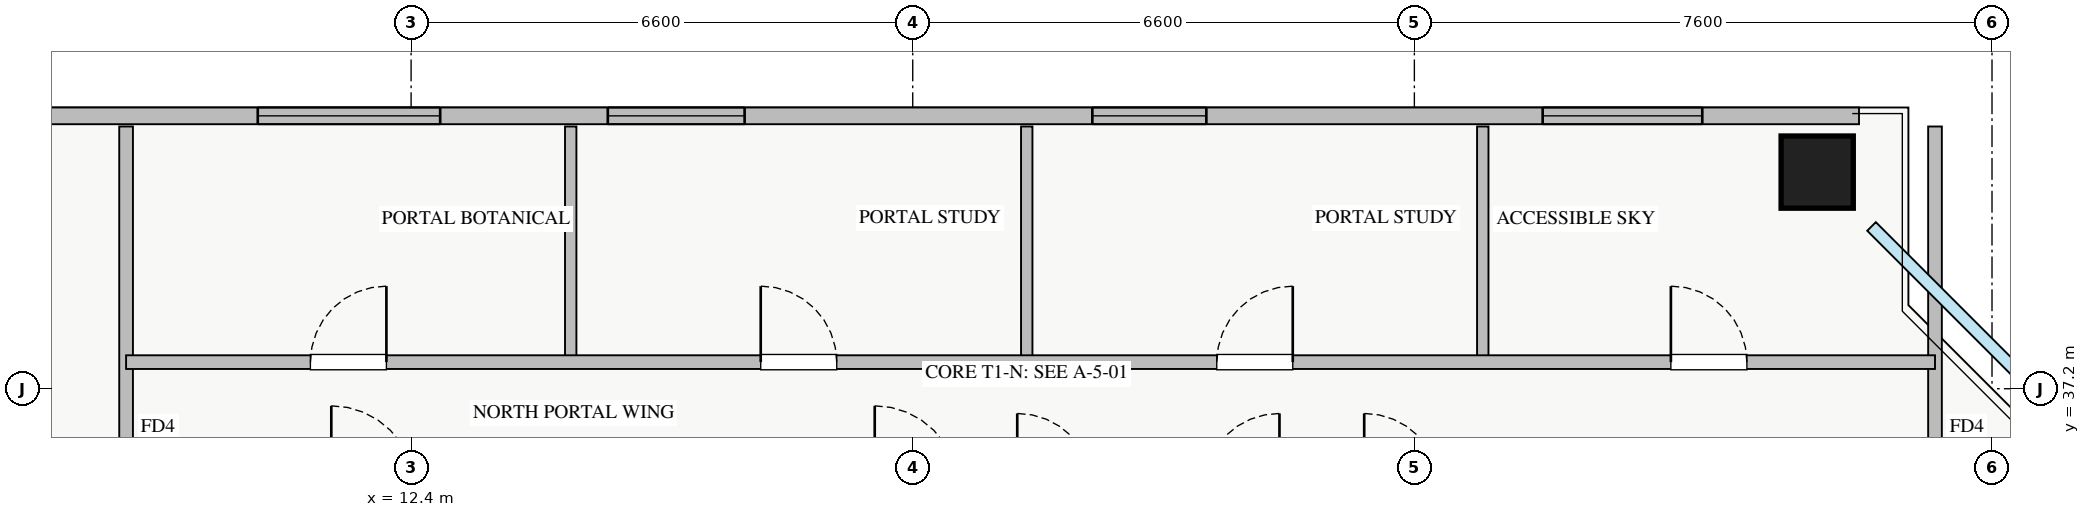
"""IFC4 building model, lengths in metres.
Left out: names, types, materials, properties, quantities, classifications, styles, units other than length and angle.
Written with IfcOpenShell. Run it as: python <this file> out.ifc"""

import sys

from ifc_helpers import new_model, si_unit, direction, frame, frame_2d, origin, origin_2d, place, context, subcontext, project, spatial, rectangle, extrude, source, transform, mapped, element, fill, save


model = new_model("IFC4")
c1 = context("Model", 3, precision=1e-05, world=origin(), true_north=direction((0.0, 1.0)))
c2 = subcontext(c1, "Body", "Model", "MODEL_VIEW")
j1 = project(units=[si_unit("LENGTHUNIT", "METRE"), si_unit("PLANEANGLEUNIT", "RADIAN")], contexts=[c1])
p1 = place(None, origin())
s1 = spatial("IfcSite", under=j1, at=p1, CompositionType="ELEMENT")
p2 = place(p1, origin())
s2 = spatial("IfcBuilding", under=s1, at=p2, CompositionType="ELEMENT")
p3 = place(p2, frame((0.0, 0.0, 166.5)))
s3 = spatial("IfcBuildingStorey", under=s2, at=p3, CompositionType="ELEMENT", Elevation=166.5)
m1 = source(origin(), c2, "Body", "SweptSolid", [
    extrude(rectangle(XDim=0.95, YDim=0.95, at=origin_2d()), origin(), (0.0, 0.0, 1.0), 3.25),
])
p4 = place(p3, frame((30.9, 40.05, 0.0), z_axis=(0.0, 0.0, 1.0), x_axis=(1.0, 0.0, 0.0)))
e1 = element("IfcColumn", 1, at=p4, inside=s3, PredefinedType="COLUMN", context=c2, shape_type="MappedRepresentation", body=[
    mapped(m1, transform((0.0, 0.0, 0.0), x_axis=(1.0, 0.0, 0.0), y_axis=(0.0, 1.0, 0.0), z_axis=(0.0, 0.0, 1.0), scale=1.0)),
])
p5 = place(p3, frame((6.55, 40.79, 0.0), z_axis=(0.0, 0.0, 1.0), x_axis=(1.0, 0.0, 0.0)))
e2 = element("IfcWall", 2, at=p5, inside=s3, PredefinedType="STANDARD", context=c2, shape_type="SweptSolid", body=[
    extrude(rectangle(XDim=24.9, YDim=0.22, at=frame_2d((12.45, 0.0))), origin(), (0.0, 0.0, 1.0), 2.61),
])
p6 = place(p5, frame((3.833, 0.0, 0.9)))
e3 = element("IfcOpeningElement", 3, at=p6, cuts=e2, PredefinedType="OPENING", context=c2, shape_type="SweptSolid", body=[
    extrude(rectangle(XDim=2.4, YDim=1.5, at=frame_2d((1.2, 0.75))), frame((0.0, 0.12, 0.0), z_axis=(0.0, -1.0, 0.0), x_axis=(1.0, 0.0, 0.0)), (0.0, 0.0, 1.0), 0.24),
])
p7 = place(p5, frame((8.438, 0.0, 0.9)))
e4 = element("IfcOpeningElement", 4, at=p7, cuts=e2, PredefinedType="OPENING", context=c2, shape_type="SweptSolid", body=[
    extrude(rectangle(XDim=1.8, YDim=1.45, at=frame_2d((0.9, 0.725))), frame((0.0, 0.12, 0.0), z_axis=(0.0, -1.0, 0.0), x_axis=(1.0, 0.0, 0.0)), (0.0, 0.0, 1.0), 0.24),
])
p8 = place(p5, frame((14.813, 0.0, 0.9)))
e5 = element("IfcOpeningElement", 5, at=p8, cuts=e2, PredefinedType="OPENING", context=c2, shape_type="SweptSolid", body=[
    extrude(rectangle(XDim=1.5, YDim=1.45, at=frame_2d((0.75, 0.725))), frame((0.0, 0.12, 0.0), z_axis=(0.0, -1.0, 0.0), x_axis=(1.0, 0.0, 0.0)), (0.0, 0.0, 1.0), 0.24),
])
p9 = place(p5, frame((20.738, 0.0, 0.9)))
e6 = element("IfcOpeningElement", 6, at=p9, cuts=e2, PredefinedType="OPENING", context=c2, shape_type="SweptSolid", body=[
    extrude(rectangle(XDim=2.1, YDim=1.48, at=frame_2d((1.05, 0.74))), frame((0.0, 0.12, 0.0), z_axis=(0.0, -1.0, 0.0), x_axis=(1.0, 0.0, 0.0)), (0.0, 0.0, 1.0), 0.24),
])
p10 = place(p3, frame((8.65, 29.3, 0.0), z_axis=(0.0, 0.0, 1.0), x_axis=(0.0, 1.0, 0.0)))
e7 = element("IfcWall", 7, at=p10, inside=s3, PredefinedType="PARTITIONING", context=c2, shape_type="SweptSolid", body=[
    extrude(rectangle(XDim=11.35, YDim=0.18, at=frame_2d((5.675, 0.0))), origin(), (0.0, 0.0, 1.0), 3.07),
])
p11 = place(p10, frame((1.9, 0.0, 0.0)))
e8 = element("IfcOpeningElement", 8, at=p11, cuts=e7, PredefinedType="OPENING", context=c2, shape_type="SweptSolid", body=[
    extrude(rectangle(XDim=1.0, YDim=2.05, at=frame_2d((0.5, 1.025))), frame((0.0, 0.1, 0.0), z_axis=(0.0, -1.0, 0.0), x_axis=(1.0, 0.0, 0.0)), (0.0, 0.0, 1.0), 0.2),
])
p12 = place(p10, frame((5.95, 0.0, 0.0)))
e9 = element("IfcOpeningElement", 9, at=p12, cuts=e7, PredefinedType="OPENING", context=c2, shape_type="SweptSolid", body=[
    extrude(rectangle(XDim=1.0, YDim=2.05, at=frame_2d((0.5, 1.025))), frame((0.0, 0.1, 0.0), z_axis=(0.0, -1.0, 0.0), x_axis=(1.0, 0.0, 0.0)), (0.0, 0.0, 1.0), 0.2),
])
p13 = place(p3, frame((32.45, 29.3, 0.0), z_axis=(0.0, 0.0, 1.0), x_axis=(0.0, 1.0, 0.0)))
e10 = element("IfcWall", 10, at=p13, inside=s3, PredefinedType="PARTITIONING", context=c2, shape_type="SweptSolid", body=[
    extrude(rectangle(XDim=11.35, YDim=0.18, at=frame_2d((5.675, 0.0))), origin(), (0.0, 0.0, 1.0), 3.07),
])
p14 = place(p13, frame((1.9, 0.0, 0.0)))
e11 = element("IfcOpeningElement", 11, at=p14, cuts=e10, PredefinedType="OPENING", context=c2, shape_type="SweptSolid", body=[
    extrude(rectangle(XDim=1.0, YDim=2.05, at=frame_2d((0.5, 1.025))), frame((0.0, 0.1, 0.0), z_axis=(0.0, -1.0, 0.0), x_axis=(1.0, 0.0, 0.0)), (0.0, 0.0, 1.0), 0.2),
])
p15 = place(p13, frame((5.95, 0.0, 0.0)))
e12 = element("IfcOpeningElement", 12, at=p15, cuts=e10, PredefinedType="OPENING", context=c2, shape_type="SweptSolid", body=[
    extrude(rectangle(XDim=1.0, YDim=2.05, at=frame_2d((0.5, 1.025))), frame((0.0, 0.1, 0.0), z_axis=(0.0, -1.0, 0.0), x_axis=(1.0, 0.0, 0.0)), (0.0, 0.0, 1.0), 0.2),
])
for number, where, z_axis, x_axis in (
    (13, (14.5, 37.55, 0.0), (0.0, 0.0, 1.0), (0.0, 1.0, 0.0)),
    (14, (20.5, 37.55, 0.0), (0.0, 0.0, 1.0), (0.0, 1.0, 0.0)),
    (15, (26.5, 37.55, 0.0), (0.0, 0.0, 1.0), (0.0, 1.0, 0.0)),
):
    element("IfcWall", number, at=place(p3, frame(where, z_axis=z_axis, x_axis=x_axis)), inside=s3, PredefinedType="PARTITIONING", context=c2, shape_type="SweptSolid", body=[
        extrude(rectangle(XDim=3.1, YDim=0.15, at=frame_2d((1.55, 0.0))), origin(), (0.0, 0.0, 1.0), 3.07),
    ])
p16 = place(p3, frame((8.65, 37.55, 0.0), z_axis=(0.0, 0.0, 1.0), x_axis=(1.0, 0.0, 0.0)))
e16 = element("IfcWall", 16, at=p16, inside=s3, PredefinedType="PARTITIONING", context=c2, shape_type="SweptSolid", body=[
    extrude(rectangle(XDim=23.8, YDim=0.18, at=frame_2d((11.9, 0.0))), origin(), (0.0, 0.0, 1.0), 3.07),
])
p17 = place(p16, frame((2.425, 0.0, 0.0)))
e17 = element("IfcOpeningElement", 17, at=p17, cuts=e16, PredefinedType="OPENING", context=c2, shape_type="SweptSolid", body=[
    extrude(rectangle(XDim=1.0, YDim=2.05, at=frame_2d((0.5, 1.025))), frame((0.0, 0.1, 0.0), z_axis=(0.0, -1.0, 0.0), x_axis=(1.0, 0.0, 0.0)), (0.0, 0.0, 1.0), 0.2),
])
p18 = place(p16, frame((8.35, 0.0, 0.0)))
e18 = element("IfcOpeningElement", 18, at=p18, cuts=e16, PredefinedType="OPENING", context=c2, shape_type="SweptSolid", body=[
    extrude(rectangle(XDim=1.0, YDim=2.05, at=frame_2d((0.5, 1.025))), frame((0.0, 0.1, 0.0), z_axis=(0.0, -1.0, 0.0), x_axis=(1.0, 0.0, 0.0)), (0.0, 0.0, 1.0), 0.2),
])
p19 = place(p16, frame((14.35, 0.0, 0.0)))
e19 = element("IfcOpeningElement", 19, at=p19, cuts=e16, PredefinedType="OPENING", context=c2, shape_type="SweptSolid", body=[
    extrude(rectangle(XDim=1.0, YDim=2.05, at=frame_2d((0.5, 1.025))), frame((0.0, 0.1, 0.0), z_axis=(0.0, -1.0, 0.0), x_axis=(1.0, 0.0, 0.0)), (0.0, 0.0, 1.0), 0.2),
])
p20 = place(p16, frame((20.325, 0.0, 0.0)))
e20 = element("IfcOpeningElement", 20, at=p20, cuts=e16, PredefinedType="OPENING", context=c2, shape_type="SweptSolid", body=[
    extrude(rectangle(XDim=1.0, YDim=2.05, at=frame_2d((0.5, 1.025))), frame((0.0, 0.1, 0.0), z_axis=(0.0, -1.0, 0.0), x_axis=(1.0, 0.0, 0.0)), (0.0, 0.0, 1.0), 0.2),
])
m2 = source(origin(), c2, "Body", "SweptSolid", [
    extrude(rectangle(XDim=2.4, YDim=1.5, at=frame_2d((1.2, 0.75))), frame((0.0, 0.03, 0.0), z_axis=(0.0, -1.0, 0.0), x_axis=(1.0, 0.0, 0.0)), (0.0, 0.0, 1.0), 0.06),
])
p21 = place(p6, origin())
e21 = element("IfcWindow", 21, at=p21, inside=s3, PartitioningType="TRIPLE_PANEL_VERTICAL", PredefinedType="WINDOW", context=c2, shape_type="MappedRepresentation", body=[
    mapped(m2, transform((0.0, 0.0, 0.0), x_axis=(1.0, 0.0, 0.0), y_axis=(0.0, 1.0, 0.0), z_axis=(0.0, 0.0, 1.0), scale=1.0)),
])
fill(e3, e21)
m3 = source(origin(), c2, "Body", "SweptSolid", [
    extrude(rectangle(XDim=1.8, YDim=1.45, at=frame_2d((0.9, 0.725))), frame((0.0, 0.03, 0.0), z_axis=(0.0, -1.0, 0.0), x_axis=(1.0, 0.0, 0.0)), (0.0, 0.0, 1.0), 0.06),
])
p22 = place(p7, origin())
e22 = element("IfcWindow", 22, at=p22, inside=s3, PartitioningType="DOUBLE_PANEL_VERTICAL", PredefinedType="WINDOW", context=c2, shape_type="MappedRepresentation", body=[
    mapped(m3, transform((0.0, 0.0, 0.0), x_axis=(1.0, 0.0, 0.0), y_axis=(0.0, 1.0, 0.0), z_axis=(0.0, 0.0, 1.0), scale=1.0)),
])
fill(e4, e22)
m4 = source(origin(), c2, "Body", "SweptSolid", [
    extrude(rectangle(XDim=1.5, YDim=1.45, at=frame_2d((0.75, 0.725))), frame((0.0, 0.03, 0.0), z_axis=(0.0, -1.0, 0.0), x_axis=(1.0, 0.0, 0.0)), (0.0, 0.0, 1.0), 0.06),
])
p23 = place(p8, origin())
e23 = element("IfcWindow", 23, at=p23, inside=s3, PartitioningType="DOUBLE_PANEL_VERTICAL", PredefinedType="WINDOW", context=c2, shape_type="MappedRepresentation", body=[
    mapped(m4, transform((0.0, 0.0, 0.0), x_axis=(1.0, 0.0, 0.0), y_axis=(0.0, 1.0, 0.0), z_axis=(0.0, 0.0, 1.0), scale=1.0)),
])
fill(e5, e23)
m5 = source(origin(), c2, "Body", "SweptSolid", [
    extrude(rectangle(XDim=2.1, YDim=1.48, at=frame_2d((1.05, 0.74))), frame((0.0, 0.03, 0.0), z_axis=(0.0, -1.0, 0.0), x_axis=(1.0, 0.0, 0.0)), (0.0, 0.0, 1.0), 0.06),
])
p24 = place(p9, origin())
e24 = element("IfcWindow", 24, at=p24, inside=s3, PartitioningType="TRIPLE_PANEL_VERTICAL", PredefinedType="WINDOW", context=c2, shape_type="MappedRepresentation", body=[
    mapped(m5, transform((0.0, 0.0, 0.0), x_axis=(1.0, 0.0, 0.0), y_axis=(0.0, 1.0, 0.0), z_axis=(0.0, 0.0, 1.0), scale=1.0)),
])
fill(e6, e24)
m6 = source(origin(), c2, "Body", "SweptSolid", [
    extrude(rectangle(XDim=1.0, YDim=2.05, at=frame_2d((0.5, 1.025))), frame((0.0, 0.025, 0.0), z_axis=(0.0, -1.0, 0.0), x_axis=(1.0, 0.0, 0.0)), (0.0, 0.0, 1.0), 0.05),
])
p25 = place(p17, origin())
e25 = element("IfcDoor", 25, at=p25, inside=s3, OperationType="SINGLE_SWING_RIGHT", PredefinedType="DOOR", context=c2, shape_type="MappedRepresentation", body=[
    mapped(m6, transform((0.0, 0.0, 0.0), x_axis=(1.0, 0.0, 0.0), y_axis=(0.0, 1.0, 0.0), z_axis=(0.0, 0.0, 1.0), scale=1.0)),
])
fill(e17, e25)
p26 = place(p18, origin())
e26 = element("IfcDoor", 26, at=p26, inside=s3, OperationType="SINGLE_SWING_LEFT", PredefinedType="DOOR", context=c2, shape_type="MappedRepresentation", body=[
    mapped(m6, transform((0.0, 0.0, 0.0), x_axis=(1.0, 0.0, 0.0), y_axis=(0.0, 1.0, 0.0), z_axis=(0.0, 0.0, 1.0), scale=1.0)),
])
fill(e18, e26)
p27 = place(p19, origin())
e27 = element("IfcDoor", 27, at=p27, inside=s3, OperationType="SINGLE_SWING_RIGHT", PredefinedType="DOOR", context=c2, shape_type="MappedRepresentation", body=[
    mapped(m6, transform((0.0, 0.0, 0.0), x_axis=(1.0, 0.0, 0.0), y_axis=(0.0, 1.0, 0.0), z_axis=(0.0, 0.0, 1.0), scale=1.0)),
])
fill(e19, e27)
p28 = place(p20, origin())
e28 = element("IfcDoor", 28, at=p28, inside=s3, OperationType="SINGLE_SWING_LEFT", PredefinedType="DOOR", context=c2, shape_type="MappedRepresentation", body=[
    mapped(m6, transform((0.0, 0.0, 0.0), x_axis=(1.0, 0.0, 0.0), y_axis=(0.0, 1.0, 0.0), z_axis=(0.0, 0.0, 1.0), scale=1.0)),
])
fill(e20, e28)
save(model, sys.argv[1])
